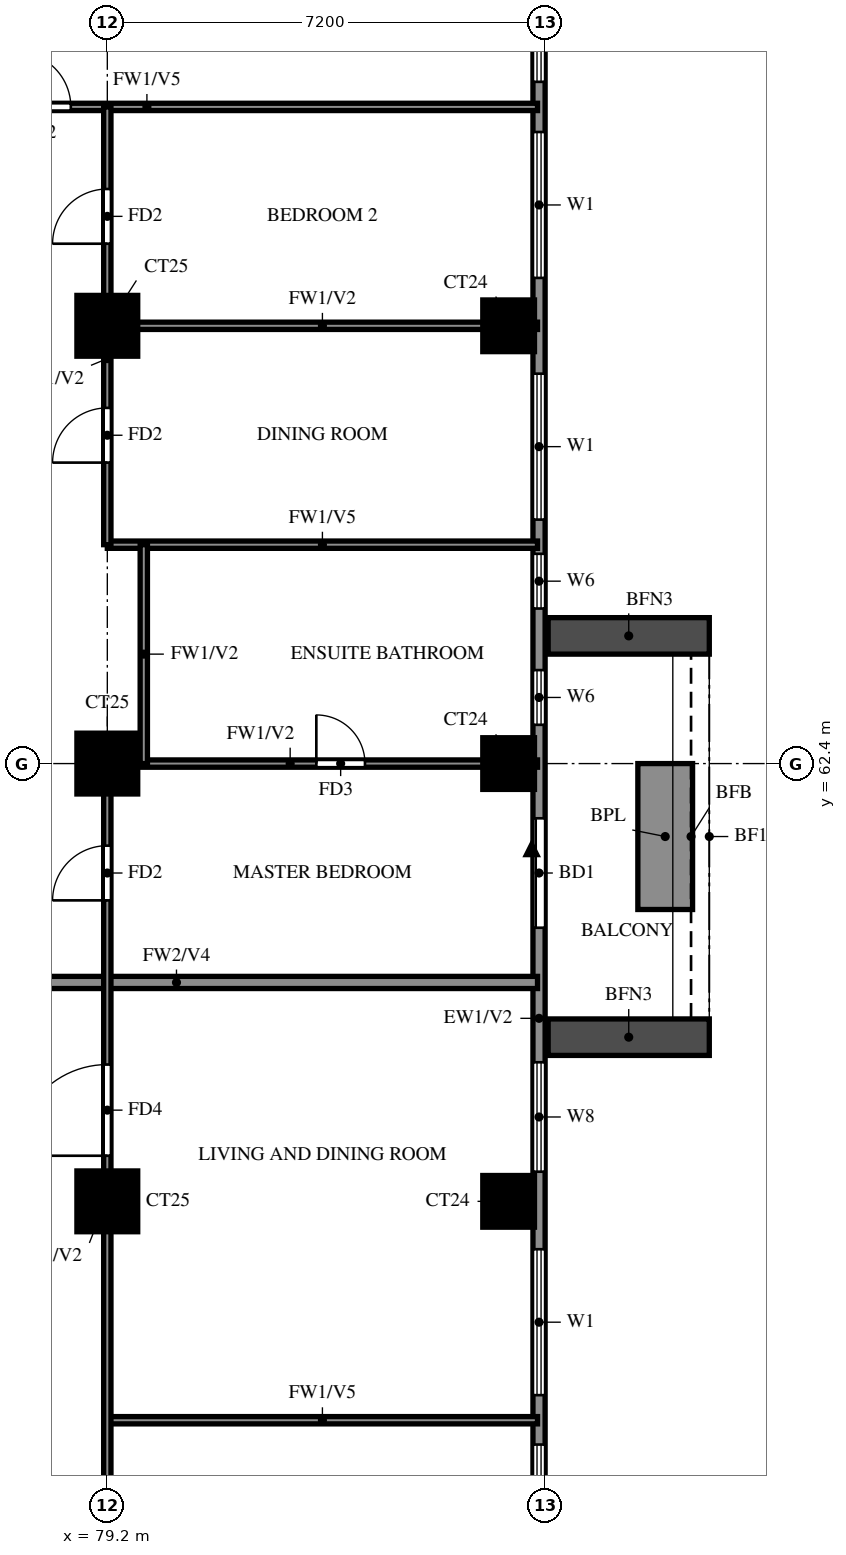
"""IFC4 building model, lengths in metres.
Left out: names, types, materials, properties, quantities, classifications, styles, units other than length and angle.
Written with IfcOpenShell. Run it as: python <this file> out.ifc"""

import sys

from ifc_helpers import new_model, si_unit, direction, frame, frame_2d, origin, origin_2d, place, context, subcontext, project, spatial, rectangle, extrude, source, transform, mapped, element, fill, save


model = new_model("IFC4")
c1 = context("Model", 3, precision=1e-05, world=origin(), true_north=direction((0.0, 1.0)))
c2 = subcontext(c1, "Body", "Model", "MODEL_VIEW")
j1 = project(units=[si_unit("LENGTHUNIT", "METRE"), si_unit("PLANEANGLEUNIT", "RADIAN")], contexts=[c1])
p1 = place(None, origin())
s1 = spatial("IfcSite", under=j1, at=p1, CompositionType="ELEMENT")
p2 = place(p1, origin())
s2 = spatial("IfcBuilding", under=s1, at=p2, CompositionType="ELEMENT")
p3 = place(p2, frame((0.0, 0.0, 150.0)))
s3 = spatial("IfcBuildingStorey", under=s2, at=p3, CompositionType="ELEMENT", Elevation=150.0)
m1 = source(origin(), c2, "Body", "SweptSolid", [
    extrude(rectangle(XDim=1.0, YDim=1.0, at=origin_2d()), origin(), (0.0, 0.0, 1.0), 3.2),
])
p4 = place(p3, frame((79.2, 55.2, 0.0), z_axis=(0.0, 0.0, 1.0), x_axis=(1.0, 0.0, 0.0)))
e1 = element("IfcColumn", 1, at=p4, inside=s3, PredefinedType="COLUMN", context=c2, shape_type="MappedRepresentation", body=[
    mapped(m1, transform((0.0, 0.0, 0.0))),
])
m2 = source(origin(), c2, "Body", "SweptSolid", [
    extrude(rectangle(XDim=0.85, YDim=0.85, at=origin_2d()), origin(), (0.0, 0.0, 1.0), 3.2),
])
p5 = place(p3, frame((85.8, 55.2, 0.0), z_axis=(0.0, 0.0, 1.0), x_axis=(1.0, 0.0, 0.0)))
e2 = element("IfcColumn", 2, at=p5, inside=s3, PredefinedType="COLUMN", context=c2, shape_type="MappedRepresentation", body=[
    mapped(m2, transform((0.0, 0.0, 0.0))),
])
p6 = place(p3, frame((79.2, 62.4, 0.0), z_axis=(0.0, 0.0, 1.0), x_axis=(1.0, 0.0, 0.0)))
e3 = element("IfcColumn", 3, at=p6, inside=s3, PredefinedType="COLUMN", context=c2, shape_type="MappedRepresentation", body=[
    mapped(m1, transform((0.0, 0.0, 0.0))),
])
p7 = place(p3, frame((85.8, 62.4, 0.0), z_axis=(0.0, 0.0, 1.0), x_axis=(1.0, 0.0, 0.0)))
e4 = element("IfcColumn", 4, at=p7, inside=s3, PredefinedType="COLUMN", context=c2, shape_type="MappedRepresentation", body=[
    mapped(m2, transform((0.0, 0.0, 0.0))),
])
p8 = place(p3, frame((79.2, 69.6, 0.0), z_axis=(0.0, 0.0, 1.0), x_axis=(1.0, 0.0, 0.0)))
e5 = element("IfcColumn", 5, at=p8, inside=s3, PredefinedType="COLUMN", context=c2, shape_type="MappedRepresentation", body=[
    mapped(m1, transform((0.0, 0.0, 0.0))),
])
p9 = place(p3, frame((85.8, 69.6, 0.0), z_axis=(0.0, 0.0, 1.0), x_axis=(1.0, 0.0, 0.0)))
e6 = element("IfcColumn", 6, at=p9, inside=s3, PredefinedType="COLUMN", context=c2, shape_type="MappedRepresentation", body=[
    mapped(m2, transform((0.0, 0.0, 0.0))),
])
p10 = place(p3, frame((86.3, 48.2, 0.0), z_axis=(0.0, 0.0, 1.0), x_axis=(0.0, 1.0, 0.0)))
e7 = element("IfcWall", 7, at=p10, inside=s3, PredefinedType="SOLIDWALL", context=c2, shape_type="SweptSolid", body=[
    extrude(rectangle(XDim=28.6, YDim=0.2, at=frame_2d((14.3, 0.0))), origin(), (0.0, 0.0, 1.0), 3.2),
])
p11 = place(p10, frame((11.5, 0.0, 0.0)))
e8 = element("IfcOpeningElement", 8, at=p11, cuts=e7, PredefinedType="OPENING", context=c2, shape_type="SweptSolid", body=[
    extrude(rectangle(XDim=1.8, YDim=2.4, at=frame_2d((0.9, 1.2))), frame((0.0, 0.11, 0.0), z_axis=(0.0, -1.0, 0.0), x_axis=(1.0, 0.0, 0.0)), (0.0, 0.0, 1.0), 0.22),
])
p12 = place(p10, frame((0.6, 0.0, 0.6)))
e9 = element("IfcOpeningElement", 9, at=p12, cuts=e7, PredefinedType="OPENING", context=c2, shape_type="SweptSolid", body=[
    extrude(rectangle(XDim=2.4, YDim=2.4, at=frame_2d((1.2, 1.2))), frame((0.0, 0.11, 0.0), z_axis=(0.0, -1.0, 0.0), x_axis=(1.0, 0.0, 0.0)), (0.0, 0.0, 1.0), 0.22),
])
p13 = place(p10, frame((3.812, 0.0, 0.6)))
e10 = element("IfcOpeningElement", 10, at=p13, cuts=e7, PredefinedType="OPENING", context=c2, shape_type="SweptSolid", body=[
    extrude(rectangle(XDim=2.4, YDim=2.4, at=frame_2d((1.2, 1.2))), frame((0.0, 0.11, 0.0), z_axis=(0.0, -1.0, 0.0), x_axis=(1.0, 0.0, 0.0)), (0.0, 0.0, 1.0), 0.22),
])
p14 = place(p10, frame((7.488, 0.0, 0.6)))
e11 = element("IfcOpeningElement", 11, at=p14, cuts=e7, PredefinedType="OPENING", context=c2, shape_type="SweptSolid", body=[
    extrude(rectangle(XDim=1.8, YDim=2.4, at=frame_2d((0.9, 1.2))), frame((0.0, 0.11, 0.0), z_axis=(0.0, -1.0, 0.0), x_axis=(1.0, 0.0, 0.0)), (0.0, 0.0, 1.0), 0.22),
])
p15 = place(p10, frame((14.837, 0.0, 1.5)))
e12 = element("IfcOpeningElement", 12, at=p15, cuts=e7, PredefinedType="OPENING", context=c2, shape_type="SweptSolid", body=[
    extrude(rectangle(XDim=0.9, YDim=0.9, at=frame_2d((0.45, 0.45))), frame((0.0, 0.11, 0.0), z_axis=(0.0, -1.0, 0.0), x_axis=(1.0, 0.0, 0.0)), (0.0, 0.0, 1.0), 0.22),
])
p16 = place(p10, frame((16.75, 0.0, 1.5)))
e13 = element("IfcOpeningElement", 13, at=p16, cuts=e7, PredefinedType="OPENING", context=c2, shape_type="SweptSolid", body=[
    extrude(rectangle(XDim=0.9, YDim=0.9, at=frame_2d((0.45, 0.45))), frame((0.0, 0.11, 0.0), z_axis=(0.0, -1.0, 0.0), x_axis=(1.0, 0.0, 0.0)), (0.0, 0.0, 1.0), 0.22),
])
p17 = place(p10, frame((18.212, 0.0, 0.6)))
e14 = element("IfcOpeningElement", 14, at=p17, cuts=e7, PredefinedType="OPENING", context=c2, shape_type="SweptSolid", body=[
    extrude(rectangle(XDim=2.4, YDim=2.4, at=frame_2d((1.2, 1.2))), frame((0.0, 0.11, 0.0), z_axis=(0.0, -1.0, 0.0), x_axis=(1.0, 0.0, 0.0)), (0.0, 0.0, 1.0), 0.22),
])
p18 = place(p10, frame((22.188, 0.0, 0.6)))
e15 = element("IfcOpeningElement", 15, at=p18, cuts=e7, PredefinedType="OPENING", context=c2, shape_type="SweptSolid", body=[
    extrude(rectangle(XDim=2.4, YDim=2.4, at=frame_2d((1.2, 1.2))), frame((0.0, 0.11, 0.0), z_axis=(0.0, -1.0, 0.0), x_axis=(1.0, 0.0, 0.0)), (0.0, 0.0, 1.0), 0.22),
])
p19 = place(p10, frame((25.413, 0.0, 0.6)))
e16 = element("IfcOpeningElement", 16, at=p19, cuts=e7, PredefinedType="OPENING", context=c2, shape_type="SweptSolid", body=[
    extrude(rectangle(XDim=2.4, YDim=2.4, at=frame_2d((1.2, 1.2))), frame((0.0, 0.11, 0.0), z_axis=(0.0, -1.0, 0.0), x_axis=(1.0, 0.0, 0.0)), (0.0, 0.0, 1.0), 0.22),
])
for number, where, z_axis, x_axis in (
    (17, (86.45, 57.9, 0.0), (0.0, 0.0, 1.0), (1.0, 0.0, 0.0)),
    (18, (86.45, 64.5, 0.0), (0.0, 0.0, 1.0), (1.0, 0.0, 0.0)),
):
    element("IfcWall", number, at=place(p3, frame(where, z_axis=z_axis, x_axis=x_axis)), inside=s3, PredefinedType="SOLIDWALL", context=c2, shape_type="SweptSolid", body=[
        extrude(rectangle(XDim=2.65, YDim=0.6, at=frame_2d((1.325, 0.0))), origin(), (0.0, 0.0, 1.0), 2.85),
    ])
p20 = place(p3, frame((88.375, 60.0, 0.0), z_axis=(0.0, 0.0, 1.0), x_axis=(0.0, 1.0, 0.0)))
e19 = element("IfcWall", 19, at=p20, inside=s3, PredefinedType="SOLIDWALL", context=c2, shape_type="SweptSolid", body=[
    extrude(rectangle(XDim=2.4, YDim=0.9, at=frame_2d((1.2, 0.0))), origin(), (0.0, 0.0, 1.0), 0.9),
])
p21 = place(p3, frame((74.4, 58.8, 0.0), z_axis=(0.0, 0.0, 1.0), x_axis=(1.0, 0.0, 0.0)))
e20 = element("IfcWall", 20, at=p21, inside=s3, PredefinedType="SOLIDWALL", context=c2, shape_type="SweptSolid", body=[
    extrude(rectangle(XDim=11.875, YDim=0.2, at=frame_2d((5.938, 0.0))), origin(), (0.0, 0.0, 1.0), 2.3),
])
p22 = place(p3, frame((79.2, 51.6, 0.0), z_axis=(0.0, 0.0, 1.0), x_axis=(1.0, 0.0, 0.0)))
e21 = element("IfcWall", 21, at=p22, inside=s3, PredefinedType="PARTITIONING", context=c2, shape_type="SweptSolid", body=[
    extrude(rectangle(XDim=7.075, YDim=0.12, at=frame_2d((3.538, 0.0))), origin(), (0.0, 0.0, 1.0), 2.3),
])
p23 = place(p3, frame((79.2, 62.4, 0.0), z_axis=(0.0, 0.0, 1.0), x_axis=(1.0, 0.0, 0.0)))
e22 = element("IfcWall", 22, at=p23, inside=s3, PredefinedType="PARTITIONING", context=c2, shape_type="SweptSolid", body=[
    extrude(rectangle(XDim=7.075, YDim=0.12, at=frame_2d((3.538, 0.0))), origin(), (0.0, 0.0, 1.0), 3.2),
])
p24 = place(p23, frame((3.438, 0.0, 0.0)))
e23 = element("IfcOpeningElement", 23, at=p24, cuts=e22, PredefinedType="OPENING", context=c2, shape_type="SweptSolid", body=[
    extrude(rectangle(XDim=0.8, YDim=2.1, at=frame_2d((0.4, 1.05))), frame((0.0, 0.07, 0.0), z_axis=(0.0, -1.0, 0.0), x_axis=(1.0, 0.0, 0.0)), (0.0, 0.0, 1.0), 0.14),
])
p25 = place(p3, frame((79.2, 66.0, 0.0), z_axis=(0.0, 0.0, 1.0), x_axis=(1.0, 0.0, 0.0)))
e24 = element("IfcWall", 24, at=p25, inside=s3, PredefinedType="PARTITIONING", context=c2, shape_type="SweptSolid", body=[
    extrude(rectangle(XDim=7.075, YDim=0.12, at=frame_2d((3.538, 0.0))), origin(), (0.0, 0.0, 1.0), 2.3),
])
p26 = place(p3, frame((79.2, 69.6, 0.0), z_axis=(0.0, 0.0, 1.0), x_axis=(1.0, 0.0, 0.0)))
e25 = element("IfcWall", 25, at=p26, inside=s3, PredefinedType="PARTITIONING", context=c2, shape_type="SweptSolid", body=[
    extrude(rectangle(XDim=7.075, YDim=0.12, at=frame_2d((3.538, 0.0))), origin(), (0.0, 0.0, 1.0), 3.2),
])
p27 = place(p3, frame((72.0, 73.2, 0.0), z_axis=(0.0, 0.0, 1.0), x_axis=(1.0, 0.0, 0.0)))
e26 = element("IfcWall", 26, at=p27, inside=s3, PredefinedType="PARTITIONING", context=c2, shape_type="SweptSolid", body=[
    extrude(rectangle(XDim=14.275, YDim=0.12, at=frame_2d((7.137, 0.0))), origin(), (0.0, 0.0, 1.0), 2.3),
])
p28 = place(p27, frame((5.7, 0.0, 0.0)))
e27 = element("IfcOpeningElement", 27, at=p28, cuts=e26, PredefinedType="OPENING", context=c2, shape_type="SweptSolid", body=[
    extrude(rectangle(XDim=0.9, YDim=2.1, at=frame_2d((0.45, 1.05))), frame((0.0, 0.07, 0.0), z_axis=(0.0, -1.0, 0.0), x_axis=(1.0, 0.0, 0.0)), (0.0, 0.0, 1.0), 0.14),
])
p29 = place(p3, frame((79.2, 48.125, 0.0), z_axis=(0.0, 0.0, 1.0), x_axis=(0.0, 1.0, 0.0)))
e28 = element("IfcWall", 28, at=p29, inside=s3, PredefinedType="PARTITIONING", context=c2, shape_type="SweptSolid", body=[
    extrude(rectangle(XDim=14.275, YDim=0.12, at=frame_2d((7.137, 0.0))), origin(), (0.0, 0.0, 1.0), 3.2),
])
p30 = place(p29, frame((1.288, 0.0, 0.0)))
e29 = element("IfcOpeningElement", 29, at=p30, cuts=e28, PredefinedType="OPENING", context=c2, shape_type="SweptSolid", body=[
    extrude(rectangle(XDim=0.9, YDim=2.1, at=frame_2d((0.45, 1.05))), frame((0.0, 0.07, 0.0), z_axis=(0.0, -1.0, 0.0), x_axis=(1.0, 0.0, 0.0)), (0.0, 0.0, 1.0), 0.14),
])
p31 = place(p29, frame((7.825, 0.0, 0.0)))
e30 = element("IfcOpeningElement", 30, at=p31, cuts=e28, PredefinedType="OPENING", context=c2, shape_type="SweptSolid", body=[
    extrude(rectangle(XDim=1.5, YDim=2.1, at=frame_2d((0.75, 1.05))), frame((0.0, 0.07, 0.0), z_axis=(0.0, -1.0, 0.0), x_axis=(1.0, 0.0, 0.0)), (0.0, 0.0, 1.0), 0.14),
])
p32 = place(p29, frame((12.025, 0.0, 0.0)))
e31 = element("IfcOpeningElement", 31, at=p32, cuts=e28, PredefinedType="OPENING", context=c2, shape_type="SweptSolid", body=[
    extrude(rectangle(XDim=0.9, YDim=2.1, at=frame_2d((0.45, 1.05))), frame((0.0, 0.07, 0.0), z_axis=(0.0, -1.0, 0.0), x_axis=(1.0, 0.0, 0.0)), (0.0, 0.0, 1.0), 0.14),
])
p33 = place(p3, frame((79.2, 66.0, 0.0), z_axis=(0.0, 0.0, 1.0), x_axis=(0.0, 1.0, 0.0)))
e32 = element("IfcWall", 32, at=p33, inside=s3, PredefinedType="PARTITIONING", context=c2, shape_type="SweptSolid", body=[
    extrude(rectangle(XDim=7.2, YDim=0.12, at=frame_2d((3.6, 0.0))), origin(), (0.0, 0.0, 1.0), 3.2),
])
p34 = place(p33, frame((1.35, 0.0, 0.0)))
e33 = element("IfcOpeningElement", 33, at=p34, cuts=e32, PredefinedType="OPENING", context=c2, shape_type="SweptSolid", body=[
    extrude(rectangle(XDim=0.9, YDim=2.1, at=frame_2d((0.45, 1.05))), frame((0.0, 0.07, 0.0), z_axis=(0.0, -1.0, 0.0), x_axis=(1.0, 0.0, 0.0)), (0.0, 0.0, 1.0), 0.14),
])
p35 = place(p33, frame((4.95, 0.0, 0.0)))
e34 = element("IfcOpeningElement", 34, at=p35, cuts=e32, PredefinedType="OPENING", context=c2, shape_type="SweptSolid", body=[
    extrude(rectangle(XDim=0.9, YDim=2.1, at=frame_2d((0.45, 1.05))), frame((0.0, 0.07, 0.0), z_axis=(0.0, -1.0, 0.0), x_axis=(1.0, 0.0, 0.0)), (0.0, 0.0, 1.0), 0.14),
])
p36 = place(p3, frame((79.8, 62.4, 0.0), z_axis=(0.0, 0.0, 1.0), x_axis=(0.0, 1.0, 0.0)))
e35 = element("IfcWall", 35, at=p36, inside=s3, PredefinedType="PARTITIONING", context=c2, shape_type="SweptSolid", body=[
    extrude(rectangle(XDim=3.6, YDim=0.12, at=frame_2d((1.8, 0.0))), origin(), (0.0, 0.0, 1.0), 3.2),
])
p37 = place(p11, origin())
e36 = element("IfcDoor", 36, at=p37, inside=s3, OperationType="DOUBLE_DOOR_SLIDING", PredefinedType="DOOR", context=c2, shape_type="SweptSolid", body=[
    extrude(rectangle(XDim=1.8, YDim=2.4, at=frame_2d((0.9, 1.2))), frame((0.0, 0.025, 0.0), z_axis=(0.0, -1.0, 0.0), x_axis=(1.0, 0.0, 0.0)), (0.0, 0.0, 1.0), 0.05),
])
fill(e8, e36)
p38 = place(p12, origin())
e37 = element("IfcWindow", 37, at=p38, inside=s3, PartitioningType="DOUBLE_PANEL_VERTICAL", PredefinedType="WINDOW", context=c2, shape_type="SweptSolid", body=[
    extrude(rectangle(XDim=2.4, YDim=2.4, at=frame_2d((1.2, 1.2))), frame((0.0, 0.03, 0.0), z_axis=(0.0, -1.0, 0.0), x_axis=(1.0, 0.0, 0.0)), (0.0, 0.0, 1.0), 0.06),
])
fill(e9, e37)
p39 = place(p13, origin())
e38 = element("IfcWindow", 38, at=p39, inside=s3, PartitioningType="DOUBLE_PANEL_VERTICAL", PredefinedType="WINDOW", context=c2, shape_type="SweptSolid", body=[
    extrude(rectangle(XDim=2.4, YDim=2.4, at=frame_2d((1.2, 1.2))), frame((0.0, 0.03, 0.0), z_axis=(0.0, -1.0, 0.0), x_axis=(1.0, 0.0, 0.0)), (0.0, 0.0, 1.0), 0.06),
])
fill(e10, e38)
p40 = place(p14, origin())
e39 = element("IfcWindow", 39, at=p40, inside=s3, PartitioningType="DOUBLE_PANEL_VERTICAL", PredefinedType="WINDOW", context=c2, shape_type="SweptSolid", body=[
    extrude(rectangle(XDim=1.8, YDim=2.4, at=frame_2d((0.9, 1.2))), frame((0.0, 0.03, 0.0), z_axis=(0.0, -1.0, 0.0), x_axis=(1.0, 0.0, 0.0)), (0.0, 0.0, 1.0), 0.06),
])
fill(e11, e39)
p41 = place(p15, origin())
e40 = element("IfcWindow", 40, at=p41, inside=s3, PartitioningType="SINGLE_PANEL", PredefinedType="WINDOW", context=c2, shape_type="SweptSolid", body=[
    extrude(rectangle(XDim=0.9, YDim=0.9, at=frame_2d((0.45, 0.45))), frame((0.0, 0.03, 0.0), z_axis=(0.0, -1.0, 0.0), x_axis=(1.0, 0.0, 0.0)), (0.0, 0.0, 1.0), 0.06),
])
fill(e12, e40)
p42 = place(p16, origin())
e41 = element("IfcWindow", 41, at=p42, inside=s3, PartitioningType="SINGLE_PANEL", PredefinedType="WINDOW", context=c2, shape_type="SweptSolid", body=[
    extrude(rectangle(XDim=0.9, YDim=0.9, at=frame_2d((0.45, 0.45))), frame((0.0, 0.03, 0.0), z_axis=(0.0, -1.0, 0.0), x_axis=(1.0, 0.0, 0.0)), (0.0, 0.0, 1.0), 0.06),
])
fill(e13, e41)
p43 = place(p17, origin())
e42 = element("IfcWindow", 42, at=p43, inside=s3, PartitioningType="DOUBLE_PANEL_VERTICAL", PredefinedType="WINDOW", context=c2, shape_type="SweptSolid", body=[
    extrude(rectangle(XDim=2.4, YDim=2.4, at=frame_2d((1.2, 1.2))), frame((0.0, 0.03, 0.0), z_axis=(0.0, -1.0, 0.0), x_axis=(1.0, 0.0, 0.0)), (0.0, 0.0, 1.0), 0.06),
])
fill(e14, e42)
p44 = place(p18, origin())
e43 = element("IfcWindow", 43, at=p44, inside=s3, PartitioningType="DOUBLE_PANEL_VERTICAL", PredefinedType="WINDOW", context=c2, shape_type="SweptSolid", body=[
    extrude(rectangle(XDim=2.4, YDim=2.4, at=frame_2d((1.2, 1.2))), frame((0.0, 0.03, 0.0), z_axis=(0.0, -1.0, 0.0), x_axis=(1.0, 0.0, 0.0)), (0.0, 0.0, 1.0), 0.06),
])
fill(e15, e43)
p45 = place(p19, origin())
e44 = element("IfcWindow", 44, at=p45, inside=s3, PartitioningType="DOUBLE_PANEL_VERTICAL", PredefinedType="WINDOW", context=c2, shape_type="SweptSolid", body=[
    extrude(rectangle(XDim=2.4, YDim=2.4, at=frame_2d((1.2, 1.2))), frame((0.0, 0.03, 0.0), z_axis=(0.0, -1.0, 0.0), x_axis=(1.0, 0.0, 0.0)), (0.0, 0.0, 1.0), 0.06),
])
fill(e16, e44)
p46 = place(p31, origin())
e45 = element("IfcDoor", 45, at=p46, inside=s3, OperationType="SINGLE_SWING_RIGHT", PredefinedType="DOOR", context=c2, shape_type="SweptSolid", body=[
    extrude(rectangle(XDim=1.5, YDim=2.1, at=frame_2d((0.75, 1.05))), frame((0.0, 0.025, 0.0), z_axis=(0.0, -1.0, 0.0), x_axis=(1.0, 0.0, 0.0)), (0.0, 0.0, 1.0), 0.05),
])
fill(e30, e45)
p47 = place(p32, origin())
e46 = element("IfcDoor", 46, at=p47, inside=s3, OperationType="SINGLE_SWING_LEFT", PredefinedType="DOOR", context=c2, shape_type="SweptSolid", body=[
    extrude(rectangle(XDim=0.9, YDim=2.1, at=frame_2d((0.45, 1.05))), frame((0.0, 0.025, 0.0), z_axis=(0.0, -1.0, 0.0), x_axis=(1.0, 0.0, 0.0)), (0.0, 0.0, 1.0), 0.05),
])
fill(e31, e46)
p48 = place(p24, origin())
e47 = element("IfcDoor", 47, at=p48, inside=s3, OperationType="SINGLE_SWING_LEFT", PredefinedType="DOOR", context=c2, shape_type="SweptSolid", body=[
    extrude(rectangle(XDim=0.8, YDim=2.1, at=frame_2d((0.4, 1.05))), frame((0.0, 0.025, 0.0), z_axis=(0.0, -1.0, 0.0), x_axis=(1.0, 0.0, 0.0)), (0.0, 0.0, 1.0), 0.05),
])
fill(e23, e47)
p49 = place(p34, origin())
e48 = element("IfcDoor", 48, at=p49, inside=s3, OperationType="SINGLE_SWING_RIGHT", PredefinedType="DOOR", context=c2, shape_type="SweptSolid", body=[
    extrude(rectangle(XDim=0.9, YDim=2.1, at=frame_2d((0.45, 1.05))), frame((0.0, 0.025, 0.0), z_axis=(0.0, -1.0, 0.0), x_axis=(1.0, 0.0, 0.0)), (0.0, 0.0, 1.0), 0.05),
])
fill(e33, e48)
p50 = place(p35, origin())
e49 = element("IfcDoor", 49, at=p50, inside=s3, OperationType="SINGLE_SWING_LEFT", PredefinedType="DOOR", context=c2, shape_type="SweptSolid", body=[
    extrude(rectangle(XDim=0.9, YDim=2.1, at=frame_2d((0.45, 1.05))), frame((0.0, 0.025, 0.0), z_axis=(0.0, -1.0, 0.0), x_axis=(1.0, 0.0, 0.0)), (0.0, 0.0, 1.0), 0.05),
])
fill(e34, e49)
p51 = place(p28, origin())
e50 = element("IfcDoor", 50, at=p51, inside=s3, OperationType="SINGLE_SWING_LEFT", PredefinedType="DOOR", context=c2, shape_type="SweptSolid", body=[
    extrude(rectangle(XDim=0.9, YDim=2.1, at=frame_2d((0.45, 1.05))), frame((0.0, 0.025, 0.0), z_axis=(0.0, -1.0, 0.0), x_axis=(1.0, 0.0, 0.0)), (0.0, 0.0, 1.0), 0.05),
])
fill(e27, e50)
save(model, sys.argv[1])
